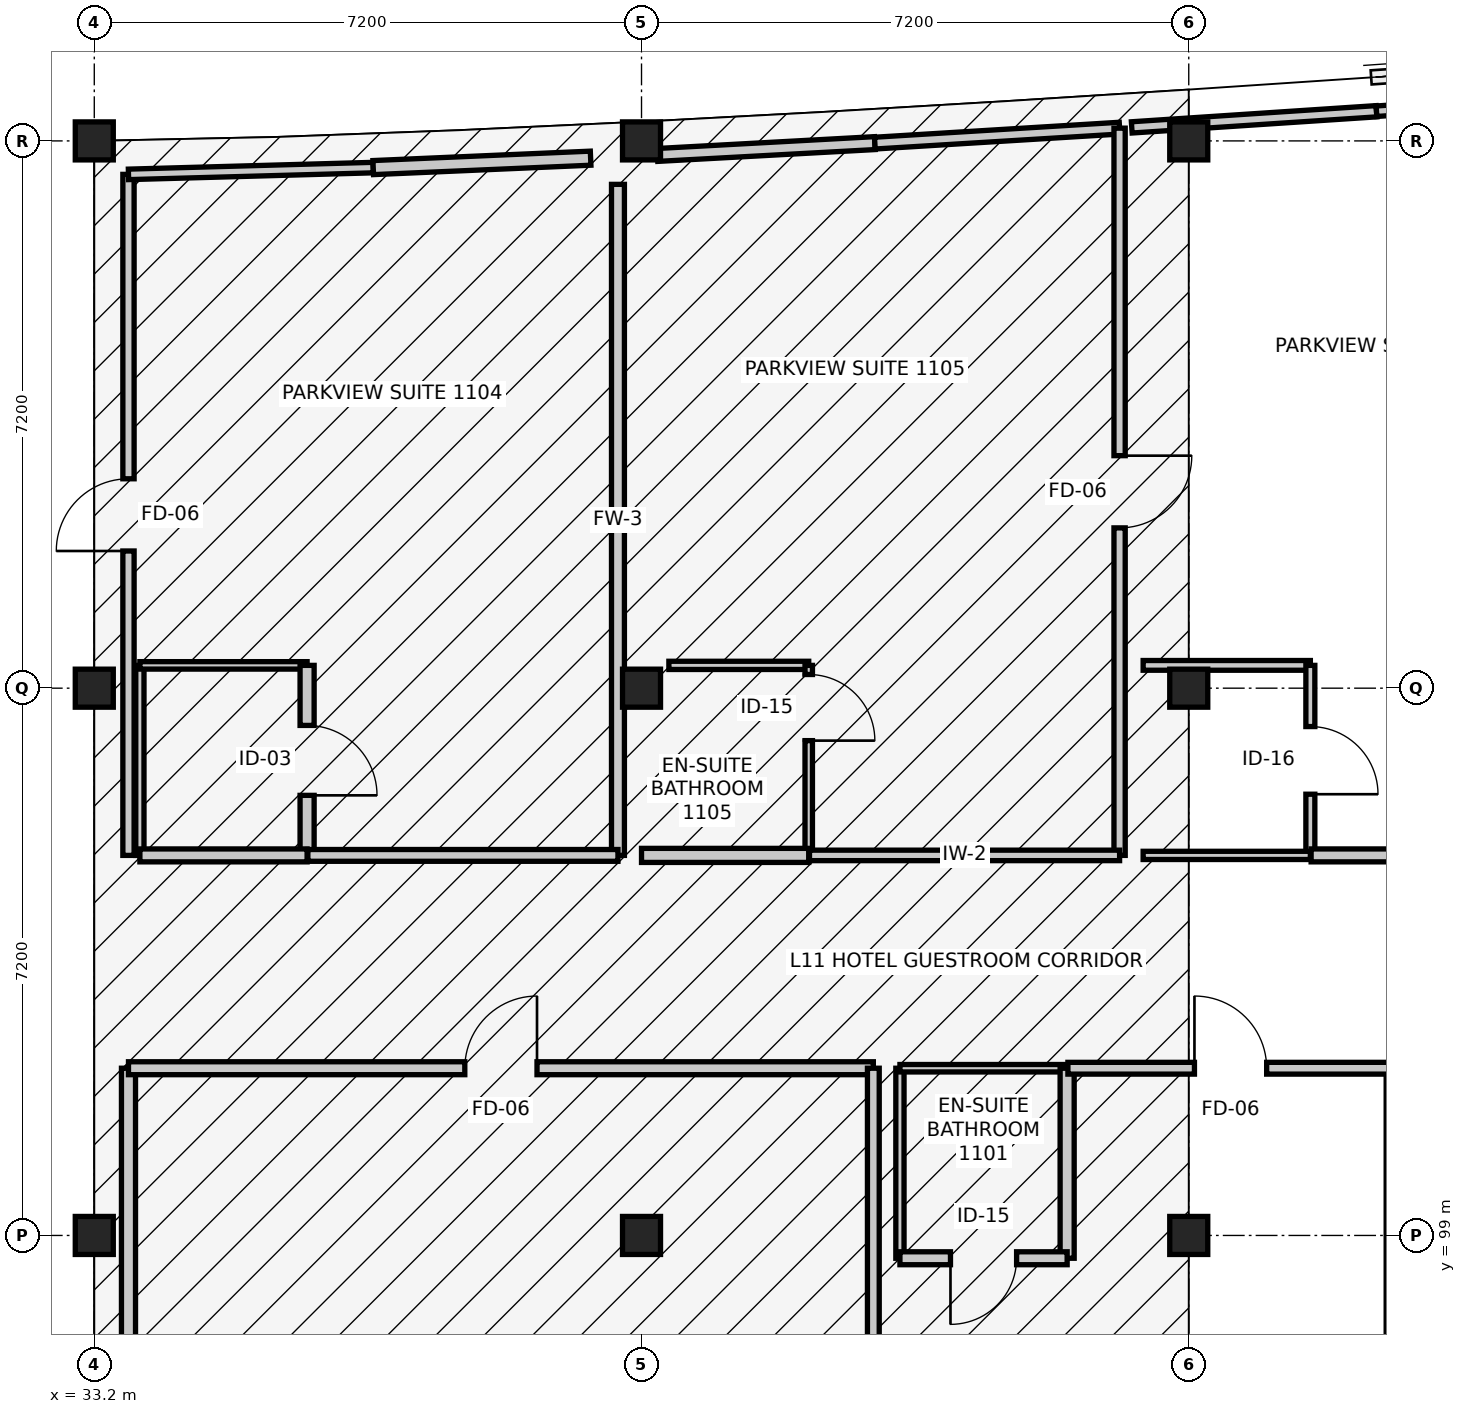
"""IFC4 building model, lengths in metres.
Left out: names, types, materials, properties, quantities, classifications, styles, units other than length and angle.
Written with IfcOpenShell. Run it as: python <this file> out.ifc"""

import sys

from ifc_helpers import new_model, si_unit, direction, frame, frame_2d, origin, origin_2d, place, context, subcontext, project, spatial, rectangle, extrude, element, fill, save


model = new_model("IFC4")
c1 = context("Model", 3, precision=1e-05, world=origin(), true_north=direction((0.0, 1.0)))
c2 = subcontext(c1, "Body", "Model", "MODEL_VIEW")
j1 = project(units=[si_unit("LENGTHUNIT", "METRE"), si_unit("PLANEANGLEUNIT", "RADIAN")], contexts=[c1])
p1 = place(None, origin())
s1 = spatial("IfcSite", under=j1, at=p1, CompositionType="ELEMENT")
p2 = place(p1, origin())
s2 = spatial("IfcBuilding", under=s1, at=p2, CompositionType="ELEMENT")
p3 = place(p2, frame((0.0, 0.0, 44.4)))
s3 = spatial("IfcBuildingStorey", under=s2, at=p3, CompositionType="ELEMENT", Elevation=44.4)
for number, where, z_axis, x_axis in (
    (1, (33.2, 99.0, 0.0), (0.0, 0.0, 1.0), (1.0, 0.0, 0.0)),
    (2, (33.2, 106.2, 0.0), (0.0, 0.0, 1.0), (1.0, 0.0, 0.0)),
    (3, (33.2, 113.4, 0.0), (0.0, 0.0, 1.0), (1.0, 0.0, 0.0)),
):
    element("IfcColumn", number, at=place(p3, frame(where, z_axis=z_axis, x_axis=x_axis)), inside=s3, PredefinedType="COLUMN", context=c2, shape_type="SweptSolid", body=[
        extrude(rectangle(XDim=0.5, YDim=0.5, at=origin_2d()), origin(), (0.0, 0.0, 1.0), 2.9),
    ])
for number, where, z_axis, x_axis in (
    (4, (40.4, 99.0, 0.0), (0.0, 0.0, 1.0), (1.0, 0.0, 0.0)),
    (5, (40.4, 106.2, 0.0), (0.0, 0.0, 1.0), (1.0, 0.0, 0.0)),
    (6, (40.4, 113.4, 0.0), (0.0, 0.0, 1.0), (1.0, 0.0, 0.0)),
):
    element("IfcColumn", number, at=place(p3, frame(where, z_axis=z_axis, x_axis=x_axis)), inside=s3, PredefinedType="COLUMN", context=c2, shape_type="SweptSolid", body=[
        extrude(rectangle(XDim=0.5, YDim=0.5, at=origin_2d()), origin(), (0.0, 0.0, 1.0), 3.475),
    ])
for number, where, z_axis, x_axis in (
    (7, (47.6, 99.0, 0.0), (0.0, 0.0, 1.0), (1.0, 0.0, 0.0)),
    (8, (47.6, 106.2, 0.0), (0.0, 0.0, 1.0), (1.0, 0.0, 0.0)),
    (9, (47.6, 113.4, 0.0), (0.0, 0.0, 1.0), (1.0, 0.0, 0.0)),
):
    element("IfcColumn", number, at=place(p3, frame(where, z_axis=z_axis, x_axis=x_axis)), inside=s3, PredefinedType="COLUMN", context=c2, shape_type="SweptSolid", body=[
        extrude(rectangle(XDim=0.5, YDim=0.5, at=origin_2d()), origin(), (0.0, 0.0, 1.0), 4.2),
    ])
p4 = place(p3, frame((33.65, 91.96, 0.0), z_axis=(0.0, 0.0, 1.0), x_axis=(0.0, 1.0, 0.0)))
e10 = element("IfcWall", 10, at=p4, inside=s3, PredefinedType="PARTITIONING", context=c2, shape_type="SweptSolid", body=[
    extrude(rectangle(XDim=9.24, YDim=0.185, at=frame_2d((4.62, 0.0))), origin(), (0.0, 0.0, 1.0), 2.25),
])
p5 = place(p3, frame((33.65, 101.2, 0.0), z_axis=(0.0, 0.0, 1.0), x_axis=(1.0, 0.0, 0.0)))
e11 = element("IfcWall", 11, at=p5, inside=s3, PredefinedType="PARTITIONING", context=c2, shape_type="SweptSolid", body=[
    extrude(rectangle(XDim=9.8, YDim=0.17, at=frame_2d((4.9, 0.0))), origin(), (0.0, 0.0, 1.0), 2.25),
])
p6 = place(p5, frame((4.425, 0.0, 0.0)))
e12 = element("IfcOpeningElement", 12, at=p6, cuts=e11, PredefinedType="OPENING", context=c2, shape_type="SweptSolid", body=[
    extrude(rectangle(XDim=0.95, YDim=2.1, at=frame_2d((0.475, 1.05))), frame((0.0, 0.095, 0.0), z_axis=(0.0, -1.0, 0.0), x_axis=(1.0, 0.0, 0.0)), (0.0, 0.0, 1.0), 0.19),
])
p7 = place(p3, frame((43.45, 101.2, 0.0), z_axis=(0.0, 0.0, 1.0), x_axis=(0.0, -1.0, 0.0)))
e13 = element("IfcWall", 13, at=p7, inside=s3, PredefinedType="PARTITIONING", context=c2, shape_type="SweptSolid", body=[
    extrude(rectangle(XDim=9.24, YDim=0.155, at=frame_2d((4.62, 0.0))), origin(), (0.0, 0.0, 1.0), 2.25),
])
p8 = place(p3, frame((43.8, 98.7, 0.0), z_axis=(0.0, 0.0, 1.0), x_axis=(0.0, 1.0, 0.0)))
e14 = element("IfcWall", 14, at=p8, inside=s3, PredefinedType="PARTITIONING", context=c2, shape_type="SweptSolid", body=[
    extrude(rectangle(XDim=2.5, YDim=0.108, at=frame_2d((1.25, 0.0))), origin(), (0.0, 0.0, 1.0), 2.25),
])
p9 = place(p3, frame((43.8, 101.2, 0.0), z_axis=(0.0, 0.0, 1.0), x_axis=(1.0, 0.0, 0.0)))
e15 = element("IfcWall", 15, at=p9, inside=s3, PredefinedType="PARTITIONING", context=c2, shape_type="SweptSolid", body=[
    extrude(rectangle(XDim=2.2, YDim=0.098, at=frame_2d((1.1, 0.0))), origin(), (0.0, 0.0, 1.0), 2.25),
])
p10 = place(p3, frame((46.0, 101.2, 0.0), z_axis=(0.0, 0.0, 1.0), x_axis=(0.0, -1.0, 0.0)))
e16 = element("IfcWall", 16, at=p10, inside=s3, PredefinedType="PARTITIONING", context=c2, shape_type="SweptSolid", body=[
    extrude(rectangle(XDim=2.5, YDim=0.185, at=frame_2d((1.25, 0.0))), origin(), (0.0, 0.0, 1.0), 2.25),
])
p11 = place(p3, frame((46.0, 98.7, 0.0), z_axis=(0.0, 0.0, 1.0), x_axis=(-1.0, 0.0, 0.0)))
e17 = element("IfcWall", 17, at=p11, inside=s3, PredefinedType="PARTITIONING", context=c2, shape_type="SweptSolid", body=[
    extrude(rectangle(XDim=2.2, YDim=0.17, at=frame_2d((1.1, 0.0))), origin(), (0.0, 0.0, 1.0), 2.25),
])
p12 = place(p11, frame((0.665, 0.0, 0.0)))
e18 = element("IfcOpeningElement", 18, at=p12, cuts=e17, PredefinedType="OPENING", context=c2, shape_type="SweptSolid", body=[
    extrude(rectangle(XDim=0.87, YDim=2.07, at=frame_2d((0.435, 1.035))), frame((0.0, 0.095, 0.0), z_axis=(0.0, -1.0, 0.0), x_axis=(1.0, 0.0, 0.0)), (0.0, 0.0, 1.0), 0.19),
])
p13 = place(p3, frame((50.29, 101.2, 0.0), z_axis=(0.0, 0.0, 1.0), x_axis=(0.0, -1.0, 0.0)))
e19 = element("IfcWall", 19, at=p13, inside=s3, PredefinedType="PARTITIONING", context=c2, shape_type="SweptSolid", body=[
    extrude(rectangle(XDim=9.24, YDim=0.185, at=frame_2d((4.62, 0.0))), origin(), (0.0, 0.0, 1.0), 3.335),
])
p14 = place(p3, frame((46.01, 101.2, 0.0), z_axis=(0.0, 0.0, 1.0), x_axis=(1.0, 0.0, 0.0)))
e20 = element("IfcWall", 20, at=p14, inside=s3, PredefinedType="PARTITIONING", context=c2, shape_type="SweptSolid", body=[
    extrude(rectangle(XDim=4.28, YDim=0.155, at=frame_2d((2.14, 0.0))), origin(), (0.0, 0.0, 1.0), 2.25),
])
p15 = place(p14, frame((1.665, 0.0, 0.0)))
e21 = element("IfcOpeningElement", 21, at=p15, cuts=e20, PredefinedType="OPENING", context=c2, shape_type="SweptSolid", body=[
    extrude(rectangle(XDim=0.95, YDim=2.1, at=frame_2d((0.475, 1.05))), frame((0.0, 0.087, 0.0), z_axis=(0.0, -1.0, 0.0), x_axis=(1.0, 0.0, 0.0)), (0.0, 0.0, 1.0), 0.175),
])
p16 = place(p3, frame((33.8, 104.0, 0.0), z_axis=(0.0, 0.0, 1.0), x_axis=(0.0, 1.0, 0.0)))
e22 = element("IfcWall", 22, at=p16, inside=s3, PredefinedType="PARTITIONING", context=c2, shape_type="SweptSolid", body=[
    extrude(rectangle(XDim=2.5, YDim=0.108, at=frame_2d((1.25, 0.0))), origin(), (0.0, 0.0, 1.0), 2.25),
])
p17 = place(p3, frame((33.8, 106.5, 0.0), z_axis=(0.0, 0.0, 1.0), x_axis=(1.0, 0.0, 0.0)))
e23 = element("IfcWall", 23, at=p17, inside=s3, PredefinedType="PARTITIONING", context=c2, shape_type="SweptSolid", body=[
    extrude(rectangle(XDim=2.2, YDim=0.098, at=frame_2d((1.1, 0.0))), origin(), (0.0, 0.0, 1.0), 2.25),
])
p18 = place(p3, frame((36.0, 106.5, 0.0), z_axis=(0.0, 0.0, 1.0), x_axis=(0.0, -1.0, 0.0)))
e24 = element("IfcWall", 24, at=p18, inside=s3, PredefinedType="PARTITIONING", context=c2, shape_type="SweptSolid", body=[
    extrude(rectangle(XDim=2.5, YDim=0.185, at=frame_2d((1.25, 0.0))), origin(), (0.0, 0.0, 1.0), 2.25),
])
p19 = place(p18, frame((0.79, 0.0, 0.0)))
e25 = element("IfcOpeningElement", 25, at=p19, cuts=e24, PredefinedType="OPENING", context=c2, shape_type="SweptSolid", body=[
    extrude(rectangle(XDim=0.92, YDim=2.1, at=frame_2d((0.46, 1.05))), frame((0.0, 0.103, 0.0), z_axis=(0.0, -1.0, 0.0), x_axis=(1.0, 0.0, 0.0)), (0.0, 0.0, 1.0), 0.205),
])
p20 = place(p3, frame((36.0, 104.0, 0.0), z_axis=(0.0, 0.0, 1.0), x_axis=(-1.0, 0.0, 0.0)))
e26 = element("IfcWall", 26, at=p20, inside=s3, PredefinedType="PARTITIONING", context=c2, shape_type="SweptSolid", body=[
    extrude(rectangle(XDim=2.2, YDim=0.17, at=frame_2d((1.1, 0.0))), origin(), (0.0, 0.0, 1.0), 2.25),
])
p21 = place(p3, frame((33.65, 104.0, 0.0), z_axis=(0.0, 0.0, 1.0), x_axis=(0.0, 1.0, 0.0)))
e27 = element("IfcWall", 27, at=p21, inside=s3, PredefinedType="PARTITIONING", context=c2, shape_type="SweptSolid", body=[
    extrude(rectangle(XDim=8.96, YDim=0.148, at=frame_2d((4.48, 0.0))), origin(), (0.0, 0.0, 1.0), 2.25),
])
p22 = place(p21, frame((4.005, 0.0, 0.0)))
e28 = element("IfcOpeningElement", 28, at=p22, cuts=e27, PredefinedType="OPENING", context=c2, shape_type="SweptSolid", body=[
    extrude(rectangle(XDim=0.95, YDim=2.1, at=frame_2d((0.475, 1.05))), frame((0.0, 0.084, 0.0), z_axis=(0.0, -1.0, 0.0), x_axis=(1.0, 0.0, 0.0)), (0.0, 0.0, 1.0), 0.168),
])
p23 = place(p3, frame((33.65, 112.96, 0.0), z_axis=(0.0, 0.0, 1.0), x_axis=(0.999617336708, 0.027661889909, 0.0)))
e29 = element("IfcWall", 29, at=p23, inside=s3, PredefinedType="PARTITIONING", context=c2, shape_type="SweptSolid", body=[
    extrude(rectangle(XDim=3.221, YDim=0.138, at=frame_2d((1.611, 0.0))), origin(), (0.0, 0.0, 1.0), 2.25),
])
p24 = place(p3, frame((36.87, 113.049, 0.0), z_axis=(0.0, 0.0, 1.0), x_axis=(0.999061139873, 0.043322497572, 0.0)))
e30 = element("IfcWall", 30, at=p24, inside=s3, PredefinedType="PARTITIONING", context=c2, shape_type="SweptSolid", body=[
    extrude(rectangle(XDim=2.863, YDim=0.185, at=frame_2d((1.431, 0.0))), origin(), (0.0, 0.0, 1.0), 2.25),
])
p25 = place(p3, frame((40.09, 112.828, 0.0), z_axis=(0.0, 0.0, 1.0), x_axis=(0.0, -1.0, 0.0)))
e31 = element("IfcWall", 31, at=p25, inside=s3, PredefinedType="PARTITIONING", context=c2, shape_type="SweptSolid", body=[
    extrude(rectangle(XDim=8.828, YDim=0.17, at=frame_2d((4.414, 0.0))), origin(), (0.0, 0.0, 1.0), 2.25),
])
p26 = place(p3, frame((40.09, 104.0, 0.0), z_axis=(0.0, 0.0, 1.0), x_axis=(-1.0, 0.0, 0.0)))
e32 = element("IfcWall", 32, at=p26, inside=s3, PredefinedType="PARTITIONING", context=c2, shape_type="SweptSolid", body=[
    extrude(rectangle(XDim=4.08, YDim=0.155, at=frame_2d((2.04, 0.0))), origin(), (0.0, 0.0, 1.0), 2.25),
])
p27 = place(p3, frame((40.76, 106.5, 0.0), z_axis=(0.0, 0.0, 1.0), x_axis=(1.0, 0.0, 0.0)))
e33 = element("IfcWall", 33, at=p27, inside=s3, PredefinedType="PARTITIONING", context=c2, shape_type="SweptSolid", body=[
    extrude(rectangle(XDim=1.84, YDim=0.108, at=frame_2d((0.92, 0.0))), origin(), (0.0, 0.0, 1.0), 2.25),
])
p28 = place(p3, frame((42.6, 106.5, 0.0), z_axis=(0.0, 0.0, 1.0), x_axis=(0.0, -1.0, 0.0)))
e34 = element("IfcWall", 34, at=p28, inside=s3, PredefinedType="PARTITIONING", context=c2, shape_type="SweptSolid", body=[
    extrude(rectangle(XDim=2.5, YDim=0.098, at=frame_2d((1.25, 0.0))), origin(), (0.0, 0.0, 1.0), 2.25),
])
p29 = place(p28, frame((0.12, 0.0, 0.0)))
e35 = element("IfcOpeningElement", 35, at=p29, cuts=e34, PredefinedType="OPENING", context=c2, shape_type="SweptSolid", body=[
    extrude(rectangle(XDim=0.87, YDim=2.07, at=frame_2d((0.435, 1.035))), frame((0.0, 0.059, 0.0), z_axis=(0.0, -1.0, 0.0), x_axis=(1.0, 0.0, 0.0)), (0.0, 0.0, 1.0), 0.118),
])
p30 = place(p3, frame((42.6, 104.0, 0.0), z_axis=(0.0, 0.0, 1.0), x_axis=(-1.0, 0.0, 0.0)))
e36 = element("IfcWall", 36, at=p30, inside=s3, PredefinedType="PARTITIONING", context=c2, shape_type="SweptSolid", body=[
    extrude(rectangle(XDim=2.2, YDim=0.185, at=frame_2d((1.1, 0.0))), origin(), (0.0, 0.0, 1.0), 2.25),
])
p31 = place(p3, frame((40.609, 113.215, 0.0), z_axis=(0.0, 0.0, 1.0), x_axis=(0.998525466616, 0.054285288234, 0.0)))
e37 = element("IfcWall", 37, at=p31, inside=s3, PredefinedType="PARTITIONING", context=c2, shape_type="SweptSolid", body=[
    extrude(rectangle(XDim=2.865, YDim=0.17, at=frame_2d((1.432, 0.0))), origin(), (0.0, 0.0, 1.0), 2.25),
])
p32 = place(p3, frame((43.47, 113.371, 0.0), z_axis=(0.0, 0.0, 1.0), x_axis=(0.998137904351, 0.060997736819, 0.0)))
e38 = element("IfcWall", 38, at=p32, inside=s3, PredefinedType="PARTITIONING", context=c2, shape_type="SweptSolid", body=[
    extrude(rectangle(XDim=3.226, YDim=0.155, at=frame_2d((1.613, 0.0))), origin(), (0.0, 0.0, 1.0), 2.25),
])
p33 = place(p3, frame((46.69, 113.568, 0.0), z_axis=(0.0, 0.0, 1.0), x_axis=(0.0, -1.0, 0.0)))
e39 = element("IfcWall", 39, at=p33, inside=s3, PredefinedType="PARTITIONING", context=c2, shape_type="SweptSolid", body=[
    extrude(rectangle(XDim=9.568, YDim=0.148, at=frame_2d((4.784, 0.0))), origin(), (0.0, 0.0, 1.0), 2.25),
])
p34 = place(p33, frame((4.309, 0.0, 0.0)))
e40 = element("IfcOpeningElement", 40, at=p34, cuts=e39, PredefinedType="OPENING", context=c2, shape_type="SweptSolid", body=[
    extrude(rectangle(XDim=0.95, YDim=2.1, at=frame_2d((0.475, 1.05))), frame((0.0, 0.084, 0.0), z_axis=(0.0, -1.0, 0.0), x_axis=(1.0, 0.0, 0.0)), (0.0, 0.0, 1.0), 0.168),
])
p35 = place(p3, frame((46.69, 104.0, 0.0), z_axis=(0.0, 0.0, 1.0), x_axis=(-1.0, 0.0, 0.0)))
e41 = element("IfcWall", 41, at=p35, inside=s3, PredefinedType="PARTITIONING", context=c2, shape_type="SweptSolid", body=[
    extrude(rectangle(XDim=4.08, YDim=0.138, at=frame_2d((2.04, 0.0))), origin(), (0.0, 0.0, 1.0), 2.25),
])
p36 = place(p3, frame((47.0, 106.5, 0.0), z_axis=(0.0, 0.0, 1.0), x_axis=(1.0, 0.0, 0.0)))
e42 = element("IfcWall", 42, at=p36, inside=s3, PredefinedType="PARTITIONING", context=c2, shape_type="SweptSolid", body=[
    extrude(rectangle(XDim=2.2, YDim=0.128, at=frame_2d((1.1, 0.0))), origin(), (0.0, 0.0, 1.0), 2.25),
])
p37 = place(p3, frame((49.2, 106.5, 0.0), z_axis=(0.0, 0.0, 1.0), x_axis=(0.0, -1.0, 0.0)))
e43 = element("IfcWall", 43, at=p37, inside=s3, PredefinedType="PARTITIONING", context=c2, shape_type="SweptSolid", body=[
    extrude(rectangle(XDim=2.5, YDim=0.118, at=frame_2d((1.25, 0.0))), origin(), (0.0, 0.0, 1.0), 3.335),
])
p38 = place(p37, frame((0.805, 0.0, 0.0)))
e44 = element("IfcOpeningElement", 44, at=p38, cuts=e43, PredefinedType="OPENING", context=c2, shape_type="SweptSolid", body=[
    extrude(rectangle(XDim=0.89, YDim=2.09, at=frame_2d((0.445, 1.045))), frame((0.0, 0.069, 0.0), z_axis=(0.0, -1.0, 0.0), x_axis=(1.0, 0.0, 0.0)), (0.0, 0.0, 1.0), 0.138),
])
p39 = place(p3, frame((49.2, 104.0, 0.0), z_axis=(0.0, 0.0, 1.0), x_axis=(-1.0, 0.0, 0.0)))
e45 = element("IfcWall", 45, at=p39, inside=s3, PredefinedType="PARTITIONING", context=c2, shape_type="SweptSolid", body=[
    extrude(rectangle(XDim=2.2, YDim=0.108, at=frame_2d((1.1, 0.0))), origin(), (0.0, 0.0, 1.0), 2.25),
])
p40 = place(p3, frame((46.85, 113.578, 0.0), z_axis=(0.0, 0.0, 1.0), x_axis=(0.997831445724, 0.065821014313, 0.0)))
e46 = element("IfcWall", 46, at=p40, inside=s3, PredefinedType="PARTITIONING", context=c2, shape_type="SweptSolid", body=[
    extrude(rectangle(XDim=3.227, YDim=0.148, at=frame_2d((1.614, 0.0))), origin(), (0.0, 0.0, 1.0), 2.25),
])
p41 = place(p3, frame((50.07, 113.79, 0.0), z_axis=(0.0, 0.0, 1.0), x_axis=(0.99758644543, 0.069435465684, 0.0)))
e47 = element("IfcWall", 47, at=p41, inside=s3, PredefinedType="PARTITIONING", context=c2, shape_type="SweptSolid", body=[
    extrude(rectangle(XDim=3.228, YDim=0.138, at=frame_2d((1.614, 0.0))), origin(), (0.0, 0.0, 1.0), 3.95),
])
p42 = place(p3, frame((53.29, 104.0, 0.0), z_axis=(0.0, 0.0, 1.0), x_axis=(-1.0, 0.0, 0.0)))
e48 = element("IfcWall", 48, at=p42, inside=s3, PredefinedType="PARTITIONING", context=c2, shape_type="SweptSolid", body=[
    extrude(rectangle(XDim=4.08, YDim=0.17, at=frame_2d((2.04, 0.0))), origin(), (0.0, 0.0, 1.0), 3.95),
])
p43 = place(p42, frame((1.565, 0.0, 0.0)))
e49 = element("IfcOpeningElement", 49, at=p43, cuts=e48, PredefinedType="OPENING", context=c2, shape_type="SweptSolid", body=[
    extrude(rectangle(XDim=0.95, YDim=2.1, at=frame_2d((0.475, 1.05))), frame((0.0, 0.095, 0.0), z_axis=(0.0, -1.0, 0.0), x_axis=(1.0, 0.0, 0.0)), (0.0, 0.0, 1.0), 0.19),
])
p44 = place(p6, origin())
e50 = element("IfcDoor", 50, at=p44, inside=s3, OperationType="SINGLE_SWING_RIGHT", PredefinedType="DOOR", context=c2, shape_type="SweptSolid", body=[
    extrude(rectangle(XDim=0.95, YDim=2.1, at=frame_2d((0.475, 1.05))), frame((0.0, 0.025, 0.0), z_axis=(0.0, -1.0, 0.0), x_axis=(1.0, 0.0, 0.0)), (0.0, 0.0, 1.0), 0.05),
])
fill(e12, e50)
p45 = place(p12, origin())
e51 = element("IfcDoor", 51, at=p45, inside=s3, OperationType="SINGLE_SWING_RIGHT", PredefinedType="DOOR", context=c2, shape_type="SweptSolid", body=[
    extrude(rectangle(XDim=0.87, YDim=2.07, at=frame_2d((0.435, 1.035))), frame((0.0, 0.025, 0.0), z_axis=(0.0, -1.0, 0.0), x_axis=(1.0, 0.0, 0.0)), (0.0, 0.0, 1.0), 0.05),
])
fill(e18, e51)
p46 = place(p15, origin())
e52 = element("IfcDoor", 52, at=p46, inside=s3, OperationType="SINGLE_SWING_LEFT", PredefinedType="DOOR", context=c2, shape_type="SweptSolid", body=[
    extrude(rectangle(XDim=0.95, YDim=2.1, at=frame_2d((0.475, 1.05))), frame((0.0, 0.025, 0.0), z_axis=(0.0, -1.0, 0.0), x_axis=(1.0, 0.0, 0.0)), (0.0, 0.0, 1.0), 0.05),
])
fill(e21, e52)
p47 = place(p19, origin())
e53 = element("IfcDoor", 53, at=p47, inside=s3, OperationType="SINGLE_SWING_RIGHT", PredefinedType="DOOR", context=c2, shape_type="SweptSolid", body=[
    extrude(rectangle(XDim=0.92, YDim=2.1, at=frame_2d((0.46, 1.05))), frame((0.0, 0.025, 0.0), z_axis=(0.0, -1.0, 0.0), x_axis=(1.0, 0.0, 0.0)), (0.0, 0.0, 1.0), 0.05),
])
fill(e25, e53)
p48 = place(p22, origin())
e54 = element("IfcDoor", 54, at=p48, inside=s3, OperationType="SINGLE_SWING_LEFT", PredefinedType="DOOR", context=c2, shape_type="SweptSolid", body=[
    extrude(rectangle(XDim=0.95, YDim=2.1, at=frame_2d((0.475, 1.05))), frame((0.0, 0.025, 0.0), z_axis=(0.0, -1.0, 0.0), x_axis=(1.0, 0.0, 0.0)), (0.0, 0.0, 1.0), 0.05),
])
fill(e28, e54)
p49 = place(p29, origin())
e55 = element("IfcDoor", 55, at=p49, inside=s3, OperationType="SINGLE_SWING_RIGHT", PredefinedType="DOOR", context=c2, shape_type="SweptSolid", body=[
    extrude(rectangle(XDim=0.87, YDim=2.07, at=frame_2d((0.435, 1.035))), frame((0.0, 0.025, 0.0), z_axis=(0.0, -1.0, 0.0), x_axis=(1.0, 0.0, 0.0)), (0.0, 0.0, 1.0), 0.05),
])
fill(e35, e55)
p50 = place(p34, origin())
e56 = element("IfcDoor", 56, at=p50, inside=s3, OperationType="SINGLE_SWING_LEFT", PredefinedType="DOOR", context=c2, shape_type="SweptSolid", body=[
    extrude(rectangle(XDim=0.95, YDim=2.1, at=frame_2d((0.475, 1.05))), frame((0.0, 0.025, 0.0), z_axis=(0.0, -1.0, 0.0), x_axis=(1.0, 0.0, 0.0)), (0.0, 0.0, 1.0), 0.05),
])
fill(e40, e56)
p51 = place(p38, origin())
e57 = element("IfcDoor", 57, at=p51, inside=s3, OperationType="SINGLE_SWING_RIGHT", PredefinedType="DOOR", context=c2, shape_type="SweptSolid", body=[
    extrude(rectangle(XDim=0.89, YDim=2.09, at=frame_2d((0.445, 1.045))), frame((0.0, 0.025, 0.0), z_axis=(0.0, -1.0, 0.0), x_axis=(1.0, 0.0, 0.0)), (0.0, 0.0, 1.0), 0.05),
])
fill(e44, e57)
save(model, sys.argv[1])
